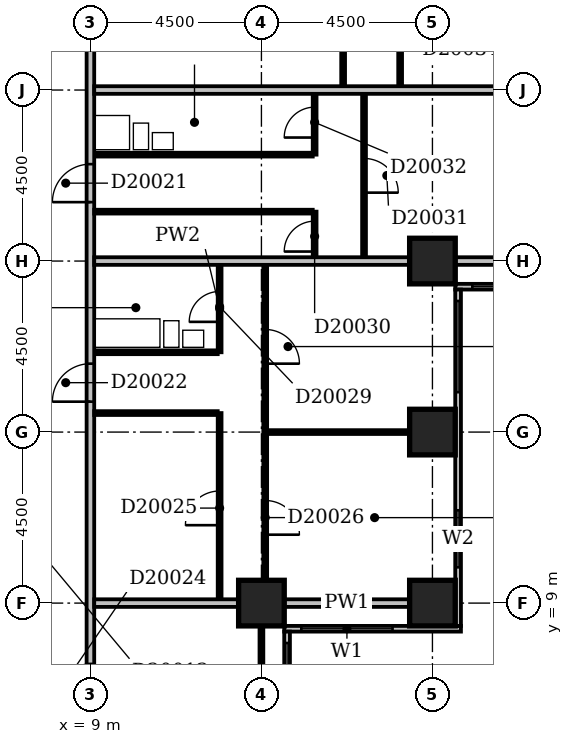
"""IFC4 building model, lengths in metres.
Left out: names, types, materials, properties, quantities, classifications, styles, units other than length and angle.
Written with IfcOpenShell. Run it as: python <this file> out.ifc"""

import sys

from ifc_helpers import new_model, si_unit, direction, frame, frame_2d, origin, origin_2d, place, context, subcontext, project, spatial, rectangle, extrude, element, fill, save


model = new_model("IFC4")
c1 = context("Model", 3, precision=1e-05, world=origin(), true_north=direction((0.0, 1.0)))
c2 = subcontext(c1, "Body", "Model", "MODEL_VIEW")
j1 = project(units=[si_unit("LENGTHUNIT", "METRE"), si_unit("PLANEANGLEUNIT", "RADIAN")], contexts=[c1])
p1 = place(None, origin())
s1 = spatial("IfcSite", under=j1, at=p1, CompositionType="ELEMENT")
p2 = place(p1, origin())
s2 = spatial("IfcBuilding", under=s1, at=p2, CompositionType="ELEMENT")
p3 = place(p2, frame((0.0, 0.0, 83.0)))
s3 = spatial("IfcBuildingStorey", under=s2, at=p3, CompositionType="ELEMENT", Elevation=83.0)
for number, where, z_axis, x_axis in (
    (1, (13.5, 9.0, -0.3), (0.0, 0.0, 1.0), (1.0, 0.0, 0.0)),
    (2, (18.0, 9.0, -0.3), (0.0, 0.0, 1.0), (1.0, 0.0, 0.0)),
    (3, (18.0, 13.5, -0.3), (0.0, 0.0, 1.0), (1.0, 0.0, 0.0)),
    (4, (18.0, 18.0, -0.3), (0.0, 0.0, 1.0), (1.0, 0.0, 0.0)),
):
    element("IfcColumn", number, at=place(p3, frame(where, z_axis=z_axis, x_axis=x_axis)), inside=s3, PredefinedType="COLUMN", context=c2, shape_type="SweptSolid", body=[
        extrude(rectangle(XDim=1.2, YDim=1.2, at=origin_2d()), origin(), (0.0, 0.0, 1.0), 3.6),
    ])
p4 = place(p3, frame((14.175, 3.9, 0.0), z_axis=(0.0, 0.0, 1.0), x_axis=(0.0, 1.0, 0.0)))
e5 = element("IfcWall", 5, at=p4, inside=s3, PredefinedType="STANDARD", context=c2, shape_type="SweptSolid", body=[
    extrude(rectangle(XDim=4.35, YDim=0.15, at=frame_2d((2.175, 0.0))), origin(), (0.0, 0.0, 1.0), 2.7),
])
p5 = place(p4, frame((1.65, 0.0, 0.6)))
e6 = element("IfcOpeningElement", 6, at=p5, cuts=e5, PredefinedType="OPENING", context=c2, shape_type="SweptSolid", body=[
    extrude(rectangle(XDim=2.4, YDim=1.8, at=frame_2d((1.2, 0.9))), frame((0.0, 0.087, 0.0), z_axis=(0.0, -1.0, 0.0), x_axis=(1.0, 0.0, 0.0)), (0.0, 0.0, 1.0), 0.174),
])
p6 = place(p3, frame((14.1, 8.325, 0.0), z_axis=(0.0, 0.0, 1.0), x_axis=(1.0, 0.0, 0.0)))
e7 = element("IfcWall", 7, at=p6, inside=s3, PredefinedType="STANDARD", context=c2, shape_type="SweptSolid", body=[
    extrude(rectangle(XDim=4.65, YDim=0.15, at=frame_2d((2.325, 0.0))), origin(), (0.0, 0.0, 1.0), 2.7),
])
p7 = place(p6, frame((0.45, 0.0, 0.6)))
e8 = element("IfcOpeningElement", 8, at=p7, cuts=e7, PredefinedType="OPENING", context=c2, shape_type="SweptSolid", body=[
    extrude(rectangle(XDim=2.4, YDim=1.8, at=frame_2d((1.2, 0.9))), frame((0.0, 0.087, 0.0), z_axis=(0.0, -1.0, 0.0), x_axis=(1.0, 0.0, 0.0)), (0.0, 0.0, 1.0), 0.174),
])
p8 = place(p3, frame((18.675, 8.4, 0.0), z_axis=(0.0, 0.0, 1.0), x_axis=(0.0, 1.0, 0.0)))
e9 = element("IfcWall", 9, at=p8, inside=s3, PredefinedType="STANDARD", context=c2, shape_type="SweptSolid", body=[
    extrude(rectangle(XDim=8.85, YDim=0.15, at=frame_2d((4.425, 0.0))), origin(), (0.0, 0.0, 1.0), 2.7),
])
p9 = place(p8, frame((1.542, 0.0, 0.6)))
e10 = element("IfcOpeningElement", 10, at=p9, cuts=e9, PredefinedType="OPENING", context=c2, shape_type="SweptSolid", body=[
    extrude(rectangle(XDim=1.5, YDim=1.8, at=frame_2d((0.75, 0.9))), frame((0.0, 0.087, 0.0), z_axis=(0.0, -1.0, 0.0), x_axis=(1.0, 0.0, 0.0)), (0.0, 0.0, 1.0), 0.174),
])
p10 = place(p8, frame((6.15, 0.0, 0.6)))
e11 = element("IfcOpeningElement", 11, at=p10, cuts=e9, PredefinedType="OPENING", context=c2, shape_type="SweptSolid", body=[
    extrude(rectangle(XDim=2.4, YDim=1.8, at=frame_2d((1.2, 0.9))), frame((0.0, 0.087, 0.0), z_axis=(0.0, -1.0, 0.0), x_axis=(1.0, 0.0, 0.0)), (0.0, 0.0, 1.0), 0.174),
])
p11 = place(p3, frame((18.6, 17.325, 0.0), z_axis=(0.0, 0.0, 1.0), x_axis=(1.0, 0.0, 0.0)))
e12 = element("IfcWall", 12, at=p11, inside=s3, PredefinedType="STANDARD", context=c2, shape_type="SweptSolid", body=[
    extrude(rectangle(XDim=4.65, YDim=0.15, at=frame_2d((2.325, 0.0))), origin(), (0.0, 0.0, 1.0), 2.7),
])
p12 = place(p11, frame((0.45, 0.0, 0.6)))
e13 = element("IfcOpeningElement", 13, at=p12, cuts=e12, PredefinedType="OPENING", context=c2, shape_type="SweptSolid", body=[
    extrude(rectangle(XDim=2.4, YDim=1.8, at=frame_2d((1.2, 0.9))), frame((0.0, 0.087, 0.0), z_axis=(0.0, -1.0, 0.0), x_axis=(1.0, 0.0, 0.0)), (0.0, 0.0, 1.0), 0.174),
])
p13 = place(p3, frame((9.0, 5.0, 0.0), z_axis=(0.0, 0.0, 1.0), x_axis=(0.0, 1.0, 0.0)))
e14 = element("IfcWall", 14, at=p13, inside=s3, PredefinedType="PARTITIONING", context=c2, shape_type="SweptSolid", body=[
    extrude(rectangle(XDim=44.5, YDim=0.2, at=frame_2d((22.25, 0.0))), origin(), (0.0, 0.0, 1.0), 3.3),
])
p14 = place(p13, frame((28.45, 0.0, 0.0)))
e15 = element("IfcOpeningElement", 15, at=p14, cuts=e14, PredefinedType="OPENING", context=c2, shape_type="SweptSolid", body=[
    extrude(rectangle(XDim=1.0, YDim=2.1, at=frame_2d((0.5, 1.05))), frame((0.0, 0.112, 0.0), z_axis=(0.0, -1.0, 0.0), x_axis=(1.0, 0.0, 0.0)), (0.0, 0.0, 1.0), 0.224),
])
p15 = place(p13, frame((22.8, 0.0, 0.0)))
e16 = element("IfcOpeningElement", 16, at=p15, cuts=e14, PredefinedType="OPENING", context=c2, shape_type="SweptSolid", body=[
    extrude(rectangle(XDim=1.0, YDim=2.1, at=frame_2d((0.5, 1.05))), frame((0.0, 0.112, 0.0), z_axis=(0.0, -1.0, 0.0), x_axis=(1.0, 0.0, 0.0)), (0.0, 0.0, 1.0), 0.224),
])
p16 = place(p13, frame((14.55, 0.0, 0.0)))
e17 = element("IfcOpeningElement", 17, at=p16, cuts=e14, PredefinedType="OPENING", context=c2, shape_type="SweptSolid", body=[
    extrude(rectangle(XDim=1.0, YDim=2.1, at=frame_2d((0.5, 1.05))), frame((0.0, 0.112, 0.0), z_axis=(0.0, -1.0, 0.0), x_axis=(1.0, 0.0, 0.0)), (0.0, 0.0, 1.0), 0.224),
])
p17 = place(p13, frame((9.3, 0.0, 0.0)))
e18 = element("IfcOpeningElement", 18, at=p17, cuts=e14, PredefinedType="OPENING", context=c2, shape_type="SweptSolid", body=[
    extrude(rectangle(XDim=1.0, YDim=2.1, at=frame_2d((0.5, 1.05))), frame((0.0, 0.112, 0.0), z_axis=(0.0, -1.0, 0.0), x_axis=(1.0, 0.0, 0.0)), (0.0, 0.0, 1.0), 0.224),
])
p18 = place(p13, frame((35.0, 0.0, 0.0)))
e19 = element("IfcOpeningElement", 19, at=p18, cuts=e14, PredefinedType="OPENING", context=c2, shape_type="SweptSolid", body=[
    extrude(rectangle(XDim=0.9, YDim=2.1, at=frame_2d((0.45, 1.05))), frame((0.0, 0.112, 0.0), z_axis=(0.0, -1.0, 0.0), x_axis=(1.0, 0.0, 0.0)), (0.0, 0.0, 1.0), 0.224),
])
p19 = place(p13, frame((1.5, 0.0, 0.0)))
e20 = element("IfcOpeningElement", 20, at=p19, cuts=e14, PredefinedType="OPENING", context=c2, shape_type="SweptSolid", body=[
    extrude(rectangle(XDim=0.9, YDim=2.1, at=frame_2d((0.45, 1.05))), frame((0.0, 0.112, 0.0), z_axis=(0.0, -1.0, 0.0), x_axis=(1.0, 0.0, 0.0)), (0.0, 0.0, 1.0), 0.224),
])
p20 = place(p3, frame((13.5, 5.1, 0.0), z_axis=(0.0, 0.0, 1.0), x_axis=(0.0, 1.0, 0.0)))
e21 = element("IfcWall", 21, at=p20, inside=s3, PredefinedType="PARTITIONING", context=c2, shape_type="SweptSolid", body=[
    extrude(rectangle(XDim=3.3, YDim=0.1, at=frame_2d((1.65, 0.0))), origin(), (0.0, 0.0, 1.0), 2.7),
])
p21 = place(p3, frame((9.1, 9.0, 0.0), z_axis=(0.0, 0.0, 1.0), x_axis=(1.0, 0.0, 0.0)))
e22 = element("IfcWall", 22, at=p21, inside=s3, PredefinedType="PARTITIONING", context=c2, shape_type="SweptSolid", body=[
    extrude(rectangle(XDim=3.8, YDim=0.2, at=frame_2d((1.9, 0.0))), origin(), (0.0, 0.0, 1.0), 3.3),
])
p22 = place(p3, frame((14.1, 9.0, 0.0), z_axis=(0.0, 0.0, 1.0), x_axis=(1.0, 0.0, 0.0)))
e23 = element("IfcWall", 23, at=p22, inside=s3, PredefinedType="PARTITIONING", context=c2, shape_type="SweptSolid", body=[
    extrude(rectangle(XDim=3.3, YDim=0.2, at=frame_2d((1.65, 0.0))), origin(), (0.0, 0.0, 1.0), 2.7),
])
p23 = place(p3, frame((12.4, 9.1, 0.0), z_axis=(0.0, 0.0, 1.0), x_axis=(0.0, 1.0, 0.0)))
e24 = element("IfcWall", 24, at=p23, inside=s3, PredefinedType="PARTITIONING", context=c2, shape_type="SweptSolid", body=[
    extrude(rectangle(XDim=4.9, YDim=0.1, at=frame_2d((2.45, 0.0))), origin(), (0.0, 0.0, 1.0), 3.3),
])
p24 = place(p23, frame((1.95, 0.0, 0.0)))
e25 = element("IfcOpeningElement", 25, at=p24, cuts=e24, PredefinedType="OPENING", context=c2, shape_type="SweptSolid", body=[
    extrude(rectangle(XDim=0.9, YDim=2.1, at=frame_2d((0.45, 1.05))), frame((0.0, 0.062, 0.0), z_axis=(0.0, -1.0, 0.0), x_axis=(1.0, 0.0, 0.0)), (0.0, 0.0, 1.0), 0.124),
])
p25 = place(p3, frame((13.6, 9.6, 0.0), z_axis=(0.0, 0.0, 1.0), x_axis=(0.0, 1.0, 0.0)))
e26 = element("IfcWall", 26, at=p25, inside=s3, PredefinedType="PARTITIONING", context=c2, shape_type="SweptSolid", body=[
    extrude(rectangle(XDim=8.3, YDim=0.1, at=frame_2d((4.15, 0.0))), origin(), (0.0, 0.0, 1.0), 3.3),
])
p26 = place(p25, frame((1.2, 0.0, 0.0)))
e27 = element("IfcOpeningElement", 27, at=p26, cuts=e26, PredefinedType="OPENING", context=c2, shape_type="SweptSolid", body=[
    extrude(rectangle(XDim=0.9, YDim=2.1, at=frame_2d((0.45, 1.05))), frame((0.0, 0.062, 0.0), z_axis=(0.0, -1.0, 0.0), x_axis=(1.0, 0.0, 0.0)), (0.0, 0.0, 1.0), 0.124),
])
p27 = place(p25, frame((5.7, 0.0, 0.0)))
e28 = element("IfcOpeningElement", 28, at=p27, cuts=e26, PredefinedType="OPENING", context=c2, shape_type="SweptSolid", body=[
    extrude(rectangle(XDim=0.9, YDim=2.1, at=frame_2d((0.45, 1.05))), frame((0.0, 0.062, 0.0), z_axis=(0.0, -1.0, 0.0), x_axis=(1.0, 0.0, 0.0)), (0.0, 0.0, 1.0), 0.124),
])
p28 = place(p3, frame((13.65, 13.5, 0.0), z_axis=(0.0, 0.0, 1.0), x_axis=(1.0, 0.0, 0.0)))
e29 = element("IfcWall", 29, at=p28, inside=s3, PredefinedType="PARTITIONING", context=c2, shape_type="SweptSolid", body=[
    extrude(rectangle(XDim=3.75, YDim=0.1, at=frame_2d((1.875, 0.0))), origin(), (0.0, 0.0, 1.0), 3.3),
])
p29 = place(p3, frame((9.1, 14.0, 0.0), z_axis=(0.0, 0.0, 1.0), x_axis=(1.0, 0.0, 0.0)))
e30 = element("IfcWall", 30, at=p29, inside=s3, PredefinedType="PARTITIONING", context=c2, shape_type="SweptSolid", body=[
    extrude(rectangle(XDim=3.25, YDim=0.1, at=frame_2d((1.625, 0.0))), origin(), (0.0, 0.0, 1.0), 3.3),
])
p30 = place(p3, frame((9.1, 15.6, 0.0), z_axis=(0.0, 0.0, 1.0), x_axis=(1.0, 0.0, 0.0)))
e31 = element("IfcWall", 31, at=p30, inside=s3, PredefinedType="PLUMBINGWALL", context=c2, shape_type="SweptSolid", body=[
    extrude(rectangle(XDim=3.25, YDim=0.1, at=frame_2d((1.625, 0.0))), origin(), (0.0, 0.0, 1.0), 3.3),
])
p31 = place(p3, frame((12.4, 15.6, 0.0), z_axis=(0.0, 0.0, 1.0), x_axis=(0.0, 1.0, 0.0)))
e32 = element("IfcWall", 32, at=p31, inside=s3, PredefinedType="PARTITIONING", context=c2, shape_type="SweptSolid", body=[
    extrude(rectangle(XDim=2.3, YDim=0.1, at=frame_2d((1.15, 0.0))), origin(), (0.0, 0.0, 1.0), 3.3),
])
p32 = place(p31, frame((0.8, 0.0, 0.0)))
e33 = element("IfcOpeningElement", 33, at=p32, cuts=e32, PredefinedType="OPENING", context=c2, shape_type="SweptSolid", body=[
    extrude(rectangle(XDim=0.8, YDim=2.1, at=frame_2d((0.4, 1.05))), frame((0.0, 0.062, 0.0), z_axis=(0.0, -1.0, 0.0), x_axis=(1.0, 0.0, 0.0)), (0.0, 0.0, 1.0), 0.124),
])
p33 = place(p3, frame((9.1, 18.0, 0.0), z_axis=(0.0, 0.0, 1.0), x_axis=(1.0, 0.0, 0.0)))
e34 = element("IfcWall", 34, at=p33, inside=s3, PredefinedType="PARTITIONING", context=c2, shape_type="SweptSolid", body=[
    extrude(rectangle(XDim=8.3, YDim=0.2, at=frame_2d((4.15, 0.0))), origin(), (0.0, 0.0, 1.0), 2.6),
])
p34 = place(p3, frame((18.6, 18.0, 0.0), z_axis=(0.0, 0.0, 1.0), x_axis=(1.0, 0.0, 0.0)))
e35 = element("IfcWall", 35, at=p34, inside=s3, PredefinedType="PARTITIONING", context=c2, shape_type="SweptSolid", body=[
    extrude(rectangle(XDim=3.3, YDim=0.2, at=frame_2d((1.65, 0.0))), origin(), (0.0, 0.0, 1.0), 2.7),
])
p35 = place(p3, frame((14.9, 18.1, 0.0), z_axis=(0.0, 0.0, 1.0), x_axis=(0.0, 1.0, 0.0)))
e36 = element("IfcWall", 36, at=p35, inside=s3, PredefinedType="PARTITIONING", context=c2, shape_type="SweptSolid", body=[
    extrude(rectangle(XDim=1.2, YDim=0.1, at=frame_2d((0.6, 0.0))), origin(), (0.0, 0.0, 1.0), 3.3),
])
p36 = place(p35, frame((0.15, 0.0, 0.0)))
e37 = element("IfcOpeningElement", 37, at=p36, cuts=e36, PredefinedType="OPENING", context=c2, shape_type="SweptSolid", body=[
    extrude(rectangle(XDim=0.8, YDim=2.1, at=frame_2d((0.4, 1.05))), frame((0.0, 0.062, 0.0), z_axis=(0.0, -1.0, 0.0), x_axis=(1.0, 0.0, 0.0)), (0.0, 0.0, 1.0), 0.124),
])
p37 = place(p3, frame((16.2, 18.1, 0.0), z_axis=(0.0, 0.0, 1.0), x_axis=(0.0, 1.0, 0.0)))
e38 = element("IfcWall", 38, at=p37, inside=s3, PredefinedType="PARTITIONING", context=c2, shape_type="SweptSolid", body=[
    extrude(rectangle(XDim=4.3, YDim=0.1, at=frame_2d((2.15, 0.0))), origin(), (0.0, 0.0, 1.0), 3.3),
])
p38 = place(p37, frame((1.7, 0.0, 0.0)))
e39 = element("IfcOpeningElement", 39, at=p38, cuts=e38, PredefinedType="OPENING", context=c2, shape_type="SweptSolid", body=[
    extrude(rectangle(XDim=0.9, YDim=2.1, at=frame_2d((0.45, 1.05))), frame((0.0, 0.062, 0.0), z_axis=(0.0, -1.0, 0.0), x_axis=(1.0, 0.0, 0.0)), (0.0, 0.0, 1.0), 0.124),
])
p39 = place(p3, frame((9.1, 19.3, 0.0), z_axis=(0.0, 0.0, 1.0), x_axis=(1.0, 0.0, 0.0)))
e40 = element("IfcWall", 40, at=p39, inside=s3, PredefinedType="PARTITIONING", context=c2, shape_type="SweptSolid", body=[
    extrude(rectangle(XDim=5.75, YDim=0.1, at=frame_2d((2.875, 0.0))), origin(), (0.0, 0.0, 1.0), 3.3),
])
p40 = place(p3, frame((9.1, 20.8, 0.0), z_axis=(0.0, 0.0, 1.0), x_axis=(1.0, 0.0, 0.0)))
e41 = element("IfcWall", 41, at=p40, inside=s3, PredefinedType="PLUMBINGWALL", context=c2, shape_type="SweptSolid", body=[
    extrude(rectangle(XDim=5.75, YDim=0.1, at=frame_2d((2.875, 0.0))), origin(), (0.0, 0.0, 1.0), 3.3),
])
p41 = place(p3, frame((14.9, 20.8, 0.0), z_axis=(0.0, 0.0, 1.0), x_axis=(0.0, 1.0, 0.0)))
e42 = element("IfcWall", 42, at=p41, inside=s3, PredefinedType="PARTITIONING", context=c2, shape_type="SweptSolid", body=[
    extrude(rectangle(XDim=1.6, YDim=0.1, at=frame_2d((0.8, 0.0))), origin(), (0.0, 0.0, 1.0), 3.3),
])
p42 = place(p41, frame((0.45, 0.0, 0.0)))
e43 = element("IfcOpeningElement", 43, at=p42, cuts=e42, PredefinedType="OPENING", context=c2, shape_type="SweptSolid", body=[
    extrude(rectangle(XDim=0.8, YDim=2.1, at=frame_2d((0.4, 1.05))), frame((0.0, 0.062, 0.0), z_axis=(0.0, -1.0, 0.0), x_axis=(1.0, 0.0, 0.0)), (0.0, 0.0, 1.0), 0.124),
])
p43 = place(p3, frame((9.1, 22.5, 0.0), z_axis=(0.0, 0.0, 1.0), x_axis=(1.0, 0.0, 0.0)))
e44 = element("IfcWall", 44, at=p43, inside=s3, PredefinedType="PARTITIONING", context=c2, shape_type="SweptSolid", body=[
    extrude(rectangle(XDim=12.8, YDim=0.2, at=frame_2d((6.4, 0.0))), origin(), (0.0, 0.0, 1.0), 3.3),
])
p44 = place(p3, frame((15.65, 22.6, 0.0), z_axis=(0.0, 0.0, 1.0), x_axis=(0.0, 1.0, 0.0)))
e45 = element("IfcWall", 45, at=p44, inside=s3, PredefinedType="PARTITIONING", context=c2, shape_type="SweptSolid", body=[
    extrude(rectangle(XDim=4.9, YDim=0.1, at=frame_2d((2.45, 0.0))), origin(), (0.0, 0.0, 1.0), 3.3),
])
p45 = place(p44, frame((1.95, 0.0, 0.0)))
e46 = element("IfcOpeningElement", 46, at=p45, cuts=e45, PredefinedType="OPENING", context=c2, shape_type="SweptSolid", body=[
    extrude(rectangle(XDim=0.9, YDim=2.1, at=frame_2d((0.45, 1.05))), frame((0.0, 0.062, 0.0), z_axis=(0.0, -1.0, 0.0), x_axis=(1.0, 0.0, 0.0)), (0.0, 0.0, 1.0), 0.124),
])
p46 = place(p3, frame((17.15, 22.6, 0.0), z_axis=(0.0, 0.0, 1.0), x_axis=(0.0, 1.0, 0.0)))
e47 = element("IfcWall", 47, at=p46, inside=s3, PredefinedType="PARTITIONING", context=c2, shape_type="SweptSolid", body=[
    extrude(rectangle(XDim=8.8, YDim=0.1, at=frame_2d((4.4, 0.0))), origin(), (0.0, 0.0, 1.0), 3.3),
])
p47 = place(p46, frame((1.7, 0.0, 0.0)))
e48 = element("IfcOpeningElement", 48, at=p47, cuts=e47, PredefinedType="OPENING", context=c2, shape_type="SweptSolid", body=[
    extrude(rectangle(XDim=0.9, YDim=2.1, at=frame_2d((0.45, 1.05))), frame((0.0, 0.062, 0.0), z_axis=(0.0, -1.0, 0.0), x_axis=(1.0, 0.0, 0.0)), (0.0, 0.0, 1.0), 0.124),
])
p48 = place(p46, frame((5.05, 0.0, 0.0)))
e49 = element("IfcOpeningElement", 49, at=p48, cuts=e47, PredefinedType="OPENING", context=c2, shape_type="SweptSolid", body=[
    extrude(rectangle(XDim=0.9, YDim=2.1, at=frame_2d((0.45, 1.05))), frame((0.0, 0.062, 0.0), z_axis=(0.0, -1.0, 0.0), x_axis=(1.0, 0.0, 0.0)), (0.0, 0.0, 1.0), 0.124),
])
p49 = place(p5, origin())
e50 = element("IfcWindow", 50, at=p49, inside=s3, PartitioningType="SINGLE_PANEL", PredefinedType="WINDOW", context=c2, shape_type="SweptSolid", body=[
    extrude(rectangle(XDim=2.4, YDim=1.8, at=frame_2d((1.2, 0.9))), frame((0.0, 0.03, 0.0), z_axis=(0.0, -1.0, 0.0), x_axis=(1.0, 0.0, 0.0)), (0.0, 0.0, 1.0), 0.06),
])
fill(e6, e50)
p50 = place(p7, origin())
e51 = element("IfcWindow", 51, at=p50, inside=s3, PartitioningType="SINGLE_PANEL", PredefinedType="WINDOW", context=c2, shape_type="SweptSolid", body=[
    extrude(rectangle(XDim=2.4, YDim=1.8, at=frame_2d((1.2, 0.9))), frame((0.0, 0.03, 0.0), z_axis=(0.0, -1.0, 0.0), x_axis=(1.0, 0.0, 0.0)), (0.0, 0.0, 1.0), 0.06),
])
fill(e8, e51)
p51 = place(p9, origin())
e52 = element("IfcWindow", 52, at=p51, inside=s3, PartitioningType="SINGLE_PANEL", PredefinedType="WINDOW", context=c2, shape_type="SweptSolid", body=[
    extrude(rectangle(XDim=1.5, YDim=1.8, at=frame_2d((0.75, 0.9))), frame((0.0, 0.03, 0.0), z_axis=(0.0, -1.0, 0.0), x_axis=(1.0, 0.0, 0.0)), (0.0, 0.0, 1.0), 0.06),
])
fill(e10, e52)
p52 = place(p10, origin())
e53 = element("IfcWindow", 53, at=p52, inside=s3, PartitioningType="SINGLE_PANEL", PredefinedType="WINDOW", context=c2, shape_type="SweptSolid", body=[
    extrude(rectangle(XDim=2.4, YDim=1.8, at=frame_2d((1.2, 0.9))), frame((0.0, 0.03, 0.0), z_axis=(0.0, -1.0, 0.0), x_axis=(1.0, 0.0, 0.0)), (0.0, 0.0, 1.0), 0.06),
])
fill(e11, e53)
p53 = place(p12, origin())
e54 = element("IfcWindow", 54, at=p53, inside=s3, PartitioningType="SINGLE_PANEL", PredefinedType="WINDOW", context=c2, shape_type="SweptSolid", body=[
    extrude(rectangle(XDim=2.4, YDim=1.8, at=frame_2d((1.2, 0.9))), frame((0.0, 0.03, 0.0), z_axis=(0.0, -1.0, 0.0), x_axis=(1.0, 0.0, 0.0)), (0.0, 0.0, 1.0), 0.06),
])
fill(e13, e54)
p54 = place(p16, origin())
e55 = element("IfcDoor", 55, at=p54, inside=s3, OperationType="SINGLE_SWING_LEFT", PredefinedType="DOOR", context=c2, shape_type="SweptSolid", body=[
    extrude(rectangle(XDim=1.0, YDim=2.1, at=frame_2d((0.5, 1.05))), frame((0.0, 0.025, 0.0), z_axis=(0.0, -1.0, 0.0), x_axis=(1.0, 0.0, 0.0)), (0.0, 0.0, 1.0), 0.05),
])
fill(e17, e55)
p55 = place(p17, origin())
e56 = element("IfcDoor", 56, at=p55, inside=s3, OperationType="SINGLE_SWING_LEFT", PredefinedType="DOOR", context=c2, shape_type="SweptSolid", body=[
    extrude(rectangle(XDim=1.0, YDim=2.1, at=frame_2d((0.5, 1.05))), frame((0.0, 0.025, 0.0), z_axis=(0.0, -1.0, 0.0), x_axis=(1.0, 0.0, 0.0)), (0.0, 0.0, 1.0), 0.05),
])
fill(e18, e56)
p56 = place(p24, origin())
e57 = element("IfcDoor", 57, at=p56, inside=s3, OperationType="SINGLE_SWING_LEFT", PredefinedType="DOOR", context=c2, shape_type="SweptSolid", body=[
    extrude(rectangle(XDim=0.9, YDim=2.1, at=frame_2d((0.45, 1.05))), frame((0.0, 0.025, 0.0), z_axis=(0.0, -1.0, 0.0), x_axis=(1.0, 0.0, 0.0)), (0.0, 0.0, 1.0), 0.05),
])
fill(e25, e57)
p57 = place(p26, frame((0.9, 0.0, 0.0), z_axis=(0.0, 0.0, 1.0), x_axis=(-1.0, 0.0, 0.0)))
e58 = element("IfcDoor", 58, at=p57, inside=s3, OperationType="SINGLE_SWING_RIGHT", PredefinedType="DOOR", context=c2, shape_type="SweptSolid", body=[
    extrude(rectangle(XDim=0.9, YDim=2.1, at=frame_2d((0.45, 1.05))), frame((0.0, 0.025, 0.0), z_axis=(0.0, -1.0, 0.0), x_axis=(1.0, 0.0, 0.0)), (0.0, 0.0, 1.0), 0.05),
])
fill(e27, e58)
p58 = place(p27, frame((0.9, 0.0, 0.0), z_axis=(0.0, 0.0, 1.0), x_axis=(-1.0, 0.0, 0.0)))
e59 = element("IfcDoor", 59, at=p58, inside=s3, OperationType="SINGLE_SWING_RIGHT", PredefinedType="DOOR", context=c2, shape_type="SweptSolid", body=[
    extrude(rectangle(XDim=0.9, YDim=2.1, at=frame_2d((0.45, 1.05))), frame((0.0, 0.025, 0.0), z_axis=(0.0, -1.0, 0.0), x_axis=(1.0, 0.0, 0.0)), (0.0, 0.0, 1.0), 0.05),
])
fill(e28, e59)
p59 = place(p32, origin())
e60 = element("IfcDoor", 60, at=p59, inside=s3, OperationType="SINGLE_SWING_LEFT", PredefinedType="DOOR", context=c2, shape_type="SweptSolid", body=[
    extrude(rectangle(XDim=0.8, YDim=2.1, at=frame_2d((0.4, 1.05))), frame((0.0, 0.025, 0.0), z_axis=(0.0, -1.0, 0.0), x_axis=(1.0, 0.0, 0.0)), (0.0, 0.0, 1.0), 0.05),
])
fill(e33, e60)
p60 = place(p36, origin())
e61 = element("IfcDoor", 61, at=p60, inside=s3, OperationType="SINGLE_SWING_LEFT", PredefinedType="DOOR", context=c2, shape_type="SweptSolid", body=[
    extrude(rectangle(XDim=0.8, YDim=2.1, at=frame_2d((0.4, 1.05))), frame((0.0, 0.025, 0.0), z_axis=(0.0, -1.0, 0.0), x_axis=(1.0, 0.0, 0.0)), (0.0, 0.0, 1.0), 0.05),
])
fill(e37, e61)
p61 = place(p38, frame((0.9, 0.0, 0.0), z_axis=(0.0, 0.0, 1.0), x_axis=(-1.0, 0.0, 0.0)))
e62 = element("IfcDoor", 62, at=p61, inside=s3, OperationType="SINGLE_SWING_RIGHT", PredefinedType="DOOR", context=c2, shape_type="SweptSolid", body=[
    extrude(rectangle(XDim=0.9, YDim=2.1, at=frame_2d((0.45, 1.05))), frame((0.0, 0.025, 0.0), z_axis=(0.0, -1.0, 0.0), x_axis=(1.0, 0.0, 0.0)), (0.0, 0.0, 1.0), 0.05),
])
fill(e39, e62)
p62 = place(p42, origin())
e63 = element("IfcDoor", 63, at=p62, inside=s3, OperationType="SINGLE_SWING_LEFT", PredefinedType="DOOR", context=c2, shape_type="SweptSolid", body=[
    extrude(rectangle(XDim=0.8, YDim=2.1, at=frame_2d((0.4, 1.05))), frame((0.0, 0.025, 0.0), z_axis=(0.0, -1.0, 0.0), x_axis=(1.0, 0.0, 0.0)), (0.0, 0.0, 1.0), 0.05),
])
fill(e43, e63)
save(model, sys.argv[1])
